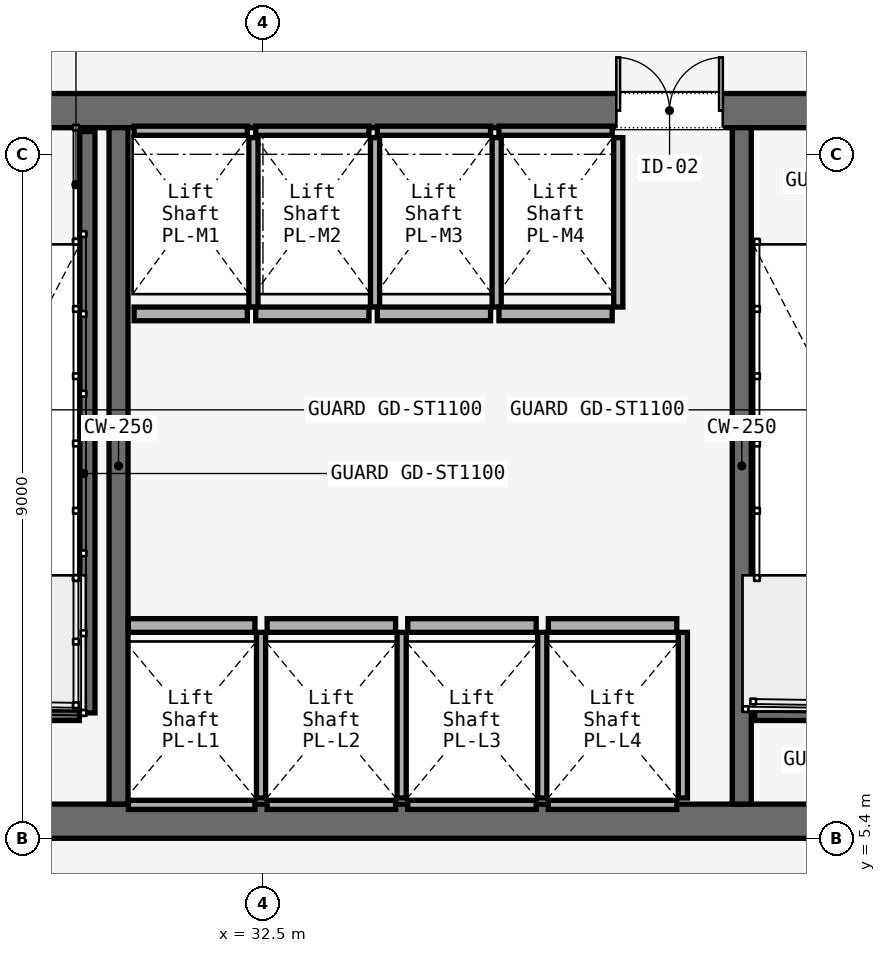
"""IFC4 building model, lengths in metres.
Left out: names, types, materials, properties, quantities, classifications, styles, units other than length and angle.
Written with IfcOpenShell. Run it as: python <this file> out.ifc"""

import sys

from ifc_helpers import new_model, si_unit, direction, frame, frame_2d, origin, place, context, subcontext, project, spatial, rectangle, extrude, element, fill, save


model = new_model("IFC4")
c1 = context("Model", 3, precision=1e-05, world=origin(), true_north=direction((0.0, 1.0)))
c2 = subcontext(c1, "Body", "Model", "MODEL_VIEW")
j1 = project(units=[si_unit("LENGTHUNIT", "METRE"), si_unit("PLANEANGLEUNIT", "RADIAN")], contexts=[c1])
p1 = place(None, origin())
s1 = spatial("IfcSite", under=j1, at=p1, CompositionType="ELEMENT")
p2 = place(p1, origin())
s2 = spatial("IfcBuilding", under=s1, at=p2, CompositionType="ELEMENT")
p3 = place(p2, frame((0.0, 0.0, 24.0)))
s3 = spatial("IfcBuildingStorey", under=s2, at=p3, CompositionType="ELEMENT", Elevation=24.0)
p4 = place(p3, frame((26.45, 14.975, 0.0), z_axis=(0.0, 0.0, 1.0), x_axis=(1.0, 0.0, 0.0)))
e1 = element("IfcWall", 1, at=p4, inside=s3, PredefinedType="SOLIDWALL", context=c2, shape_type="SweptSolid", body=[
    extrude(rectangle(XDim=31.1, YDim=0.45, at=frame_2d((15.55, 0.0))), origin(), (0.0, 0.0, 1.0), 5.55),
])
p5 = place(p4, frame((1.65, 0.0, 0.0)))
e2 = element("IfcOpeningElement", 2, at=p5, cuts=e1, PredefinedType="OPENING", context=c2, shape_type="SweptSolid", body=[
    extrude(rectangle(XDim=1.1, YDim=2.2, at=frame_2d((0.55, 1.1))), frame((0.0, 0.225, 0.0), z_axis=(0.0, -1.0, 0.0), x_axis=(1.0, 0.0, 0.0)), (0.0, 0.0, 1.0), 0.45),
])
p6 = place(p4, frame((13.65, 0.0, 0.0)))
e3 = element("IfcOpeningElement", 3, at=p6, cuts=e1, PredefinedType="OPENING", context=c2, shape_type="SweptSolid", body=[
    extrude(rectangle(XDim=1.1, YDim=2.2, at=frame_2d((0.55, 1.1))), frame((0.0, 0.225, 0.0), z_axis=(0.0, -1.0, 0.0), x_axis=(1.0, 0.0, 0.0)), (0.0, 0.0, 1.0), 0.45),
])
p7 = place(p4, frame((25.55, 0.0, 0.0)))
e4 = element("IfcOpeningElement", 4, at=p7, cuts=e1, PredefinedType="OPENING", context=c2, shape_type="SweptSolid", body=[
    extrude(rectangle(XDim=1.1, YDim=2.2, at=frame_2d((0.55, 1.1))), frame((0.0, 0.225, 0.0), z_axis=(0.0, -1.0, 0.0), x_axis=(1.0, 0.0, 0.0)), (0.0, 0.0, 1.0), 0.45),
])
p8 = place(p4, frame((10.7, 0.0, 0.0)))
e5 = element("IfcOpeningElement", 5, at=p8, cuts=e1, PredefinedType="OPENING", context=c2, shape_type="SweptSolid", body=[
    extrude(rectangle(XDim=1.4, YDim=2.2, at=frame_2d((0.7, 1.1))), frame((0.0, 0.225, 0.0), z_axis=(0.0, -1.0, 0.0), x_axis=(1.0, 0.0, 0.0)), (0.0, 0.0, 1.0), 0.45),
])
p9 = place(p4, frame((19.35, 0.0, 0.0)))
e6 = element("IfcOpeningElement", 6, at=p9, cuts=e1, PredefinedType="OPENING", context=c2, shape_type="SweptSolid", body=[
    extrude(rectangle(XDim=1.1, YDim=2.2, at=frame_2d((0.55, 1.1))), frame((0.0, 0.225, 0.0), z_axis=(0.0, -1.0, 0.0), x_axis=(1.0, 0.0, 0.0)), (0.0, 0.0, 1.0), 0.45),
])
p10 = place(p4, frame((21.4, 0.0, 0.0)))
e7 = element("IfcOpeningElement", 7, at=p10, cuts=e1, PredefinedType="OPENING", context=c2, shape_type="SweptSolid", body=[
    extrude(rectangle(XDim=0.9, YDim=2.1, at=frame_2d((0.45, 1.05))), frame((0.0, 0.225, 0.0), z_axis=(0.0, -1.0, 0.0), x_axis=(1.0, 0.0, 0.0)), (0.0, 0.0, 1.0), 0.45),
])
p11 = place(p4, frame((23.35, 0.0, 0.0)))
e8 = element("IfcOpeningElement", 8, at=p11, cuts=e1, PredefinedType="OPENING", context=c2, shape_type="SweptSolid", body=[
    extrude(rectangle(XDim=1.3, YDim=2.3, at=frame_2d((0.65, 1.15))), frame((0.0, 0.225, 0.0), z_axis=(0.0, -1.0, 0.0), x_axis=(1.0, 0.0, 0.0)), (0.0, 0.0, 1.0), 0.45),
])
p12 = place(p3, frame((26.45, 5.625, 0.0), z_axis=(0.0, 0.0, 1.0), x_axis=(1.0, 0.0, 0.0)))
e9 = element("IfcWall", 9, at=p12, inside=s3, PredefinedType="SOLIDWALL", context=c2, shape_type="SweptSolid", body=[
    extrude(rectangle(XDim=31.1, YDim=0.45, at=frame_2d((15.55, 0.0))), origin(), (0.0, 0.0, 1.0), 5.55),
])
for number, where, z_axis, x_axis in (
    (10, (30.6, 5.85, 0.0), (0.0, 0.0, 1.0), (0.0, 1.0, 0.0)),
    (11, (38.8, 5.85, 0.0), (0.0, 0.0, 1.0), (0.0, 1.0, 0.0)),
):
    element("IfcWall", number, at=place(p3, frame(where, z_axis=z_axis, x_axis=x_axis)), inside=s3, PredefinedType="SOLIDWALL", context=c2, shape_type="SweptSolid", body=[
        extrude(rectangle(XDim=8.9, YDim=0.25, at=frame_2d((4.45, 0.0))), origin(), (0.0, 0.0, 1.0), 5.55),
    ])
p13 = place(p3, frame((30.19, 14.7, 0.0), z_axis=(0.0, 0.0, 1.0), x_axis=(0.0, -1.0, 0.0)))
e12 = element("IfcWall", 12, at=p13, inside=s3, PredefinedType="SOLIDWALL", context=c2, shape_type="SweptSolid", body=[
    extrude(rectangle(XDim=7.65, YDim=0.2, at=frame_2d((3.825, 0.0))), origin(), (0.0, 0.0, 1.0), 6.0),
])
for number, where, z_axis, x_axis in (
    (13, (26.97, 7.05, 0.0), (0.0, 0.0, 1.0), (1.0, 0.0, 0.0)),
    (14, (38.97, 7.05, 0.0), (0.0, 0.0, 1.0), (1.0, 0.0, 0.0)),
):
    element("IfcWall", number, at=place(p3, frame(where, z_axis=z_axis, x_axis=x_axis)), inside=s3, PredefinedType="SOLIDWALL", context=c2, shape_type="SweptSolid", body=[
        extrude(rectangle(XDim=3.115, YDim=0.2, at=frame_2d((1.558, 0.0))), origin(), (0.0, 0.0, 1.0), 6.0),
    ])
p14 = place(p3, frame((30.73, 8.2, 0.0), z_axis=(0.0, 0.0, 1.0), x_axis=(1.0, 0.0, 0.0)))
e15 = element("IfcWall", 15, at=p14, inside=s3, PredefinedType="SOLIDWALL", context=c2, shape_type="SweptSolid", body=[
    extrude(rectangle(XDim=1.665, YDim=0.18, at=frame_2d((0.833, 0.0))), origin(), (0.0, 0.0, 1.0), 4.17),
])
p15 = place(p3, frame((30.73, 5.84, 0.0), z_axis=(0.0, 0.0, 1.0), x_axis=(1.0, 0.0, 0.0)))
e16 = element("IfcWall", 16, at=p15, inside=s3, PredefinedType="SOLIDWALL", context=c2, shape_type="SweptSolid", body=[
    extrude(rectangle(XDim=1.665, YDim=0.12, at=frame_2d((0.833, 0.0))), origin(), (0.0, 0.0, 1.0), 4.17),
])
p16 = place(p3, frame((32.475, 5.93, 0.0), z_axis=(0.0, 0.0, 1.0), x_axis=(0.0, 1.0, 0.0)))
e17 = element("IfcWall", 17, at=p16, inside=s3, PredefinedType="SOLIDWALL", context=c2, shape_type="SweptSolid", body=[
    extrude(rectangle(XDim=2.18, YDim=0.12, at=frame_2d((1.09, 0.0))), origin(), (0.0, 0.0, 1.0), 4.17),
])
p17 = place(p3, frame((32.555, 8.2, 0.0), z_axis=(0.0, 0.0, 1.0), x_axis=(1.0, 0.0, 0.0)))
e18 = element("IfcWall", 18, at=p17, inside=s3, PredefinedType="SOLIDWALL", context=c2, shape_type="SweptSolid", body=[
    extrude(rectangle(XDim=1.69, YDim=0.18, at=frame_2d((0.845, 0.0))), origin(), (0.0, 0.0, 1.0), 4.17),
])
p18 = place(p3, frame((32.555, 5.84, 0.0), z_axis=(0.0, 0.0, 1.0), x_axis=(1.0, 0.0, 0.0)))
e19 = element("IfcWall", 19, at=p18, inside=s3, PredefinedType="SOLIDWALL", context=c2, shape_type="SweptSolid", body=[
    extrude(rectangle(XDim=1.69, YDim=0.12, at=frame_2d((0.845, 0.0))), origin(), (0.0, 0.0, 1.0), 4.17),
])
p19 = place(p3, frame((34.325, 5.93, 0.0), z_axis=(0.0, 0.0, 1.0), x_axis=(0.0, 1.0, 0.0)))
e20 = element("IfcWall", 20, at=p19, inside=s3, PredefinedType="SOLIDWALL", context=c2, shape_type="SweptSolid", body=[
    extrude(rectangle(XDim=2.18, YDim=0.12, at=frame_2d((1.09, 0.0))), origin(), (0.0, 0.0, 1.0), 4.17),
])
p20 = place(p3, frame((34.405, 8.2, 0.0), z_axis=(0.0, 0.0, 1.0), x_axis=(1.0, 0.0, 0.0)))
e21 = element("IfcWall", 21, at=p20, inside=s3, PredefinedType="SOLIDWALL", context=c2, shape_type="SweptSolid", body=[
    extrude(rectangle(XDim=1.69, YDim=0.18, at=frame_2d((0.845, 0.0))), origin(), (0.0, 0.0, 1.0), 4.17),
])
p21 = place(p3, frame((34.405, 5.84, 0.0), z_axis=(0.0, 0.0, 1.0), x_axis=(1.0, 0.0, 0.0)))
e22 = element("IfcWall", 22, at=p21, inside=s3, PredefinedType="SOLIDWALL", context=c2, shape_type="SweptSolid", body=[
    extrude(rectangle(XDim=1.69, YDim=0.12, at=frame_2d((0.845, 0.0))), origin(), (0.0, 0.0, 1.0), 4.17),
])
p22 = place(p3, frame((36.175, 5.93, 0.0), z_axis=(0.0, 0.0, 1.0), x_axis=(0.0, 1.0, 0.0)))
e23 = element("IfcWall", 23, at=p22, inside=s3, PredefinedType="SOLIDWALL", context=c2, shape_type="SweptSolid", body=[
    extrude(rectangle(XDim=2.18, YDim=0.12, at=frame_2d((1.09, 0.0))), origin(), (0.0, 0.0, 1.0), 4.17),
])
p23 = place(p3, frame((36.255, 8.2, 0.0), z_axis=(0.0, 0.0, 1.0), x_axis=(1.0, 0.0, 0.0)))
e24 = element("IfcWall", 24, at=p23, inside=s3, PredefinedType="SOLIDWALL", context=c2, shape_type="SweptSolid", body=[
    extrude(rectangle(XDim=1.69, YDim=0.18, at=frame_2d((0.845, 0.0))), origin(), (0.0, 0.0, 1.0), 4.17),
])
p24 = place(p3, frame((36.255, 5.84, 0.0), z_axis=(0.0, 0.0, 1.0), x_axis=(1.0, 0.0, 0.0)))
e25 = element("IfcWall", 25, at=p24, inside=s3, PredefinedType="SOLIDWALL", context=c2, shape_type="SweptSolid", body=[
    extrude(rectangle(XDim=1.69, YDim=0.12, at=frame_2d((0.845, 0.0))), origin(), (0.0, 0.0, 1.0), 4.17),
])
p25 = place(p3, frame((38.025, 5.93, 0.0), z_axis=(0.0, 0.0, 1.0), x_axis=(0.0, 1.0, 0.0)))
e26 = element("IfcWall", 26, at=p25, inside=s3, PredefinedType="SOLIDWALL", context=c2, shape_type="SweptSolid", body=[
    extrude(rectangle(XDim=2.18, YDim=0.12, at=frame_2d((1.09, 0.0))), origin(), (0.0, 0.0, 1.0), 4.17),
])
p26 = place(p3, frame((30.805, 12.3, 0.0), z_axis=(0.0, 0.0, 1.0), x_axis=(1.0, 0.0, 0.0)))
e27 = element("IfcWall", 27, at=p26, inside=s3, PredefinedType="SOLIDWALL", context=c2, shape_type="SweptSolid", body=[
    extrude(rectangle(XDim=1.49, YDim=0.18, at=frame_2d((0.745, 0.0))), origin(), (0.0, 0.0, 1.0), 4.17),
])
p27 = place(p3, frame((30.805, 14.71, 0.0), z_axis=(0.0, 0.0, 1.0), x_axis=(1.0, 0.0, 0.0)))
e28 = element("IfcWall", 28, at=p27, inside=s3, PredefinedType="SOLIDWALL", context=c2, shape_type="SweptSolid", body=[
    extrude(rectangle(XDim=1.49, YDim=0.12, at=frame_2d((0.745, 0.0))), origin(), (0.0, 0.0, 1.0), 4.17),
])
p28 = place(p3, frame((32.375, 12.39, 0.0), z_axis=(0.0, 0.0, 1.0), x_axis=(0.0, 1.0, 0.0)))
e29 = element("IfcWall", 29, at=p28, inside=s3, PredefinedType="SOLIDWALL", context=c2, shape_type="SweptSolid", body=[
    extrude(rectangle(XDim=2.23, YDim=0.12, at=frame_2d((1.115, 0.0))), origin(), (0.0, 0.0, 1.0), 4.17),
])
p29 = place(p3, frame((32.405, 12.3, 0.0), z_axis=(0.0, 0.0, 1.0), x_axis=(1.0, 0.0, 0.0)))
e30 = element("IfcWall", 30, at=p29, inside=s3, PredefinedType="SOLIDWALL", context=c2, shape_type="SweptSolid", body=[
    extrude(rectangle(XDim=1.49, YDim=0.18, at=frame_2d((0.745, 0.0))), origin(), (0.0, 0.0, 1.0), 4.17),
])
p30 = place(p3, frame((32.405, 14.71, 0.0), z_axis=(0.0, 0.0, 1.0), x_axis=(1.0, 0.0, 0.0)))
e31 = element("IfcWall", 31, at=p30, inside=s3, PredefinedType="SOLIDWALL", context=c2, shape_type="SweptSolid", body=[
    extrude(rectangle(XDim=1.49, YDim=0.12, at=frame_2d((0.745, 0.0))), origin(), (0.0, 0.0, 1.0), 4.17),
])
p31 = place(p3, frame((33.975, 12.39, 0.0), z_axis=(0.0, 0.0, 1.0), x_axis=(0.0, 1.0, 0.0)))
e32 = element("IfcWall", 32, at=p31, inside=s3, PredefinedType="SOLIDWALL", context=c2, shape_type="SweptSolid", body=[
    extrude(rectangle(XDim=2.23, YDim=0.12, at=frame_2d((1.115, 0.0))), origin(), (0.0, 0.0, 1.0), 4.17),
])
p32 = place(p3, frame((34.005, 12.3, 0.0), z_axis=(0.0, 0.0, 1.0), x_axis=(1.0, 0.0, 0.0)))
e33 = element("IfcWall", 33, at=p32, inside=s3, PredefinedType="SOLIDWALL", context=c2, shape_type="SweptSolid", body=[
    extrude(rectangle(XDim=1.49, YDim=0.18, at=frame_2d((0.745, 0.0))), origin(), (0.0, 0.0, 1.0), 4.17),
])
p33 = place(p3, frame((34.005, 14.71, 0.0), z_axis=(0.0, 0.0, 1.0), x_axis=(1.0, 0.0, 0.0)))
e34 = element("IfcWall", 34, at=p33, inside=s3, PredefinedType="SOLIDWALL", context=c2, shape_type="SweptSolid", body=[
    extrude(rectangle(XDim=1.49, YDim=0.12, at=frame_2d((0.745, 0.0))), origin(), (0.0, 0.0, 1.0), 4.17),
])
p34 = place(p3, frame((35.575, 12.39, 0.0), z_axis=(0.0, 0.0, 1.0), x_axis=(0.0, 1.0, 0.0)))
e35 = element("IfcWall", 35, at=p34, inside=s3, PredefinedType="SOLIDWALL", context=c2, shape_type="SweptSolid", body=[
    extrude(rectangle(XDim=2.23, YDim=0.12, at=frame_2d((1.115, 0.0))), origin(), (0.0, 0.0, 1.0), 4.17),
])
p35 = place(p3, frame((35.605, 12.3, 0.0), z_axis=(0.0, 0.0, 1.0), x_axis=(1.0, 0.0, 0.0)))
e36 = element("IfcWall", 36, at=p35, inside=s3, PredefinedType="SOLIDWALL", context=c2, shape_type="SweptSolid", body=[
    extrude(rectangle(XDim=1.49, YDim=0.18, at=frame_2d((0.745, 0.0))), origin(), (0.0, 0.0, 1.0), 4.17),
])
p36 = place(p3, frame((35.605, 14.71, 0.0), z_axis=(0.0, 0.0, 1.0), x_axis=(1.0, 0.0, 0.0)))
e37 = element("IfcWall", 37, at=p36, inside=s3, PredefinedType="SOLIDWALL", context=c2, shape_type="SweptSolid", body=[
    extrude(rectangle(XDim=1.49, YDim=0.12, at=frame_2d((0.745, 0.0))), origin(), (0.0, 0.0, 1.0), 4.17),
])
p37 = place(p3, frame((37.175, 12.39, 0.0), z_axis=(0.0, 0.0, 1.0), x_axis=(0.0, 1.0, 0.0)))
e38 = element("IfcWall", 38, at=p37, inside=s3, PredefinedType="SOLIDWALL", context=c2, shape_type="SweptSolid", body=[
    extrude(rectangle(XDim=2.23, YDim=0.12, at=frame_2d((1.115, 0.0))), origin(), (0.0, 0.0, 1.0), 4.17),
])
p38 = place(p8, origin())
e39 = element("IfcDoor", 39, at=p38, inside=s3, OperationType="DOUBLE_DOOR_SINGLE_SWING", PredefinedType="DOOR", context=c2, shape_type="SweptSolid", body=[
    extrude(rectangle(XDim=1.4, YDim=2.2, at=frame_2d((0.7, 1.1))), frame((0.0, 0.025, 0.0), z_axis=(0.0, -1.0, 0.0), x_axis=(1.0, 0.0, 0.0)), (0.0, 0.0, 1.0), 0.05),
])
fill(e5, e39)
save(model, sys.argv[1])
